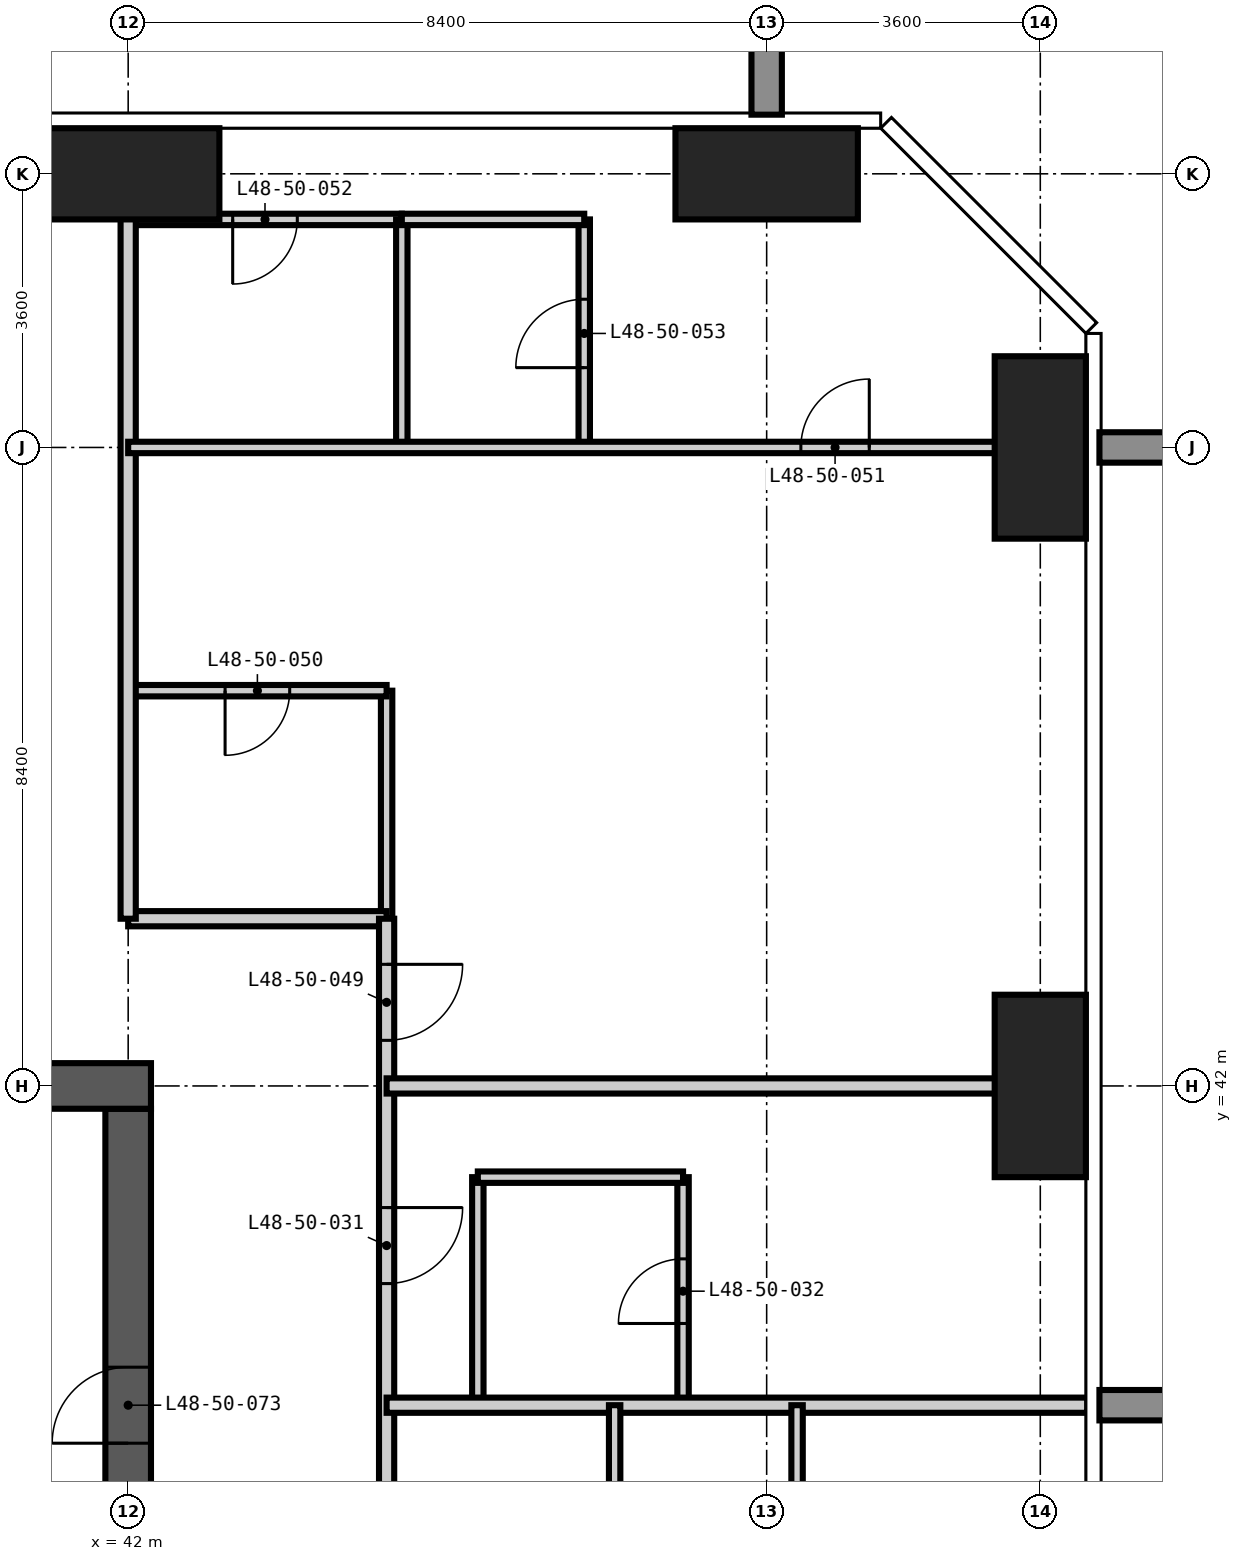
"""IFC4 building model, lengths in metres.
Left out: names, types, materials, properties, quantities, classifications, styles, units other than length and angle.
Written with IfcOpenShell. Run it as: python <this file> out.ifc"""

import sys

from ifc_helpers import new_model, si_unit, direction, frame, frame_2d, origin, origin_2d, place, context, subcontext, project, spatial, rectangle, extrude, element, fill, save


model = new_model("IFC4")
c1 = context("Model", 3, precision=1e-05, world=origin(), true_north=direction((0.0, 1.0)))
c2 = subcontext(c1, "Body", "Model", "MODEL_VIEW")
j1 = project(units=[si_unit("LENGTHUNIT", "METRE"), si_unit("PLANEANGLEUNIT", "RADIAN")], contexts=[c1])
p1 = place(None, origin())
s1 = spatial("IfcSite", under=j1, at=p1, CompositionType="ELEMENT")
p2 = place(p1, origin())
s2 = spatial("IfcBuilding", under=s1, at=p2, CompositionType="ELEMENT")
p3 = place(p2, frame((0.0, 0.0, 187.8)))
s3 = spatial("IfcBuildingStorey", under=s2, at=p3, CompositionType="ELEMENT", Elevation=187.8)
for number, where, z_axis, x_axis in (
    (1, (42.0, 54.0, -0.35), (0.0, 0.0, 1.0), (1.0, 0.0, 0.0)),
    (2, (50.4, 54.0, -0.35), (0.0, 0.0, 1.0), (1.0, 0.0, 0.0)),
):
    element("IfcColumn", number, at=place(p3, frame(where, z_axis=z_axis, x_axis=x_axis)), inside=s3, PredefinedType="COLUMN", context=c2, shape_type="SweptSolid", body=[
        extrude(rectangle(XDim=2.4, YDim=1.2, at=origin_2d()), origin(), (0.0, 0.0, 1.0), 3.6),
    ])
for number, where, z_axis, x_axis in (
    (3, (54.0, 42.0, -0.35), (0.0, 0.0, 1.0), (1.0, 0.0, 0.0)),
    (4, (54.0, 50.4, -0.35), (0.0, 0.0, 1.0), (1.0, 0.0, 0.0)),
):
    element("IfcColumn", number, at=place(p3, frame(where, z_axis=z_axis, x_axis=x_axis)), inside=s3, PredefinedType="COLUMN", context=c2, shape_type="SweptSolid", body=[
        extrude(rectangle(XDim=1.2, YDim=2.4, at=origin_2d()), origin(), (0.0, 0.0, 1.0), 3.6),
    ])
p4 = place(p3, frame((42.0, 17.1, -0.35), z_axis=(0.0, 0.0, 1.0), x_axis=(0.0, 1.0, 0.0)))
e5 = element("IfcWall", 5, at=p4, inside=s3, PredefinedType="SHEAR", context=c2, shape_type="SweptSolid", body=[
    extrude(rectangle(XDim=24.6, YDim=0.6, at=frame_2d((12.3, 0.0))), origin(), (0.0, 0.0, 1.0), 3.6),
])
p5 = place(p4, frame((0.5, 0.0, 0.35)))
e6 = element("IfcOpeningElement", 6, at=p5, cuts=e5, PredefinedType="OPENING", context=c2, shape_type="SweptSolid", body=[
    extrude(rectangle(XDim=1.2, YDim=2.2, at=frame_2d((0.6, 1.1))), frame((0.0, 0.31, 0.0), z_axis=(0.0, -1.0, 0.0), x_axis=(1.0, 0.0, 0.0)), (0.0, 0.0, 1.0), 0.62),
])
p6 = place(p4, frame((11.8, 0.0, 0.35)))
e7 = element("IfcOpeningElement", 7, at=p6, cuts=e5, PredefinedType="OPENING", context=c2, shape_type="SweptSolid", body=[
    extrude(rectangle(XDim=1.0, YDim=2.1, at=frame_2d((0.5, 1.05))), frame((0.0, 0.31, 0.0), z_axis=(0.0, -1.0, 0.0), x_axis=(1.0, 0.0, 0.0)), (0.0, 0.0, 1.0), 0.62),
])
p7 = place(p4, frame((20.2, 0.0, 0.35)))
e8 = element("IfcOpeningElement", 8, at=p7, cuts=e5, PredefinedType="OPENING", context=c2, shape_type="SweptSolid", body=[
    extrude(rectangle(XDim=1.0, YDim=2.1, at=frame_2d((0.5, 1.05))), frame((0.0, 0.31, 0.0), z_axis=(0.0, -1.0, 0.0), x_axis=(1.0, 0.0, 0.0)), (0.0, 0.0, 1.0), 0.62),
])
p8 = place(p3, frame((42.3, 42.0, -0.35), z_axis=(0.0, 0.0, 1.0), x_axis=(-1.0, 0.0, 0.0)))
e9 = element("IfcWall", 9, at=p8, inside=s3, PredefinedType="SHEAR", context=c2, shape_type="SweptSolid", body=[
    extrude(rectangle(XDim=25.8, YDim=0.6, at=frame_2d((12.9, 0.0))), origin(), (0.0, 0.0, 1.0), 3.6),
])
p9 = place(p8, frame((20.8, 0.0, 0.35)))
e10 = element("IfcOpeningElement", 10, at=p9, cuts=e9, PredefinedType="OPENING", context=c2, shape_type="SweptSolid", body=[
    extrude(rectangle(XDim=1.0, YDim=2.1, at=frame_2d((0.5, 1.05))), frame((0.0, 0.31, 0.0), z_axis=(0.0, -1.0, 0.0), x_axis=(1.0, 0.0, 0.0)), (0.0, 0.0, 1.0), 0.62),
])
p10 = place(p8, frame((10.2, 0.0, 0.35)))
e11 = element("IfcOpeningElement", 11, at=p10, cuts=e9, PredefinedType="OPENING", context=c2, shape_type="SweptSolid", body=[
    extrude(rectangle(XDim=1.2, YDim=2.2, at=frame_2d((0.6, 1.1))), frame((0.0, 0.31, 0.0), z_axis=(0.0, -1.0, 0.0), x_axis=(1.0, 0.0, 0.0)), (0.0, 0.0, 1.0), 0.62),
])
for number, where, z_axis, x_axis in (
    (12, (45.4, 44.2, 0.0), (0.0, 0.0, 1.0), (0.0, 1.0, 0.0)),
    (13, (46.6, 37.8, 0.0), (0.0, 0.0, 1.0), (0.0, 1.0, 0.0)),
):
    element("IfcWall", number, at=place(p3, frame(where, z_axis=z_axis, x_axis=x_axis)), inside=s3, PredefinedType="PARTITIONING", context=c2, shape_type="SweptSolid", body=[
        extrude(rectangle(XDim=3.0, YDim=0.15, at=frame_2d((1.5, 0.0))), origin(), (0.0, 0.0, 1.0), 3.25),
    ])
p11 = place(p3, frame((49.3, 37.8, 0.0), z_axis=(0.0, 0.0, 1.0), x_axis=(0.0, 1.0, 0.0)))
e14 = element("IfcWall", 14, at=p11, inside=s3, PredefinedType="PARTITIONING", context=c2, shape_type="SweptSolid", body=[
    extrude(rectangle(XDim=3.0, YDim=0.15, at=frame_2d((1.5, 0.0))), origin(), (0.0, 0.0, 1.0), 3.25),
])
p12 = place(p11, frame((1.075, 0.0, 0.0)))
e15 = element("IfcOpeningElement", 15, at=p12, cuts=e14, PredefinedType="OPENING", context=c2, shape_type="SweptSolid", body=[
    extrude(rectangle(XDim=0.85, YDim=2.1, at=frame_2d((0.425, 1.05))), frame((0.0, 0.085, 0.0), z_axis=(0.0, -1.0, 0.0), x_axis=(1.0, 0.0, 0.0)), (0.0, 0.0, 1.0), 0.17),
])
p13 = place(p3, frame((46.6, 40.8, 0.0), z_axis=(0.0, 0.0, 1.0), x_axis=(1.0, 0.0, 0.0)))
e16 = element("IfcWall", 16, at=p13, inside=s3, PredefinedType="PARTITIONING", context=c2, shape_type="SweptSolid", body=[
    extrude(rectangle(XDim=2.7, YDim=0.15, at=frame_2d((1.35, 0.0))), origin(), (0.0, 0.0, 1.0), 3.25),
])
p14 = place(p3, frame((42.0, 47.2, 0.0), z_axis=(0.0, 0.0, 1.0), x_axis=(1.0, 0.0, 0.0)))
e17 = element("IfcWall", 17, at=p14, inside=s3, PredefinedType="PARTITIONING", context=c2, shape_type="SweptSolid", body=[
    extrude(rectangle(XDim=3.4, YDim=0.15, at=frame_2d((1.7, 0.0))), origin(), (0.0, 0.0, 1.0), 3.25),
])
p15 = place(p14, frame((1.275, 0.0, 0.0)))
e18 = element("IfcOpeningElement", 18, at=p15, cuts=e17, PredefinedType="OPENING", context=c2, shape_type="SweptSolid", body=[
    extrude(rectangle(XDim=0.85, YDim=2.1, at=frame_2d((0.425, 1.05))), frame((0.0, 0.085, 0.0), z_axis=(0.0, -1.0, 0.0), x_axis=(1.0, 0.0, 0.0)), (0.0, 0.0, 1.0), 0.17),
])
p16 = place(p3, frame((42.0, 53.4, 0.0), z_axis=(0.0, 0.0, 1.0), x_axis=(1.0, 0.0, 0.0)))
e19 = element("IfcWall", 19, at=p16, inside=s3, PredefinedType="PARTITIONING", context=c2, shape_type="SweptSolid", body=[
    extrude(rectangle(XDim=3.6, YDim=0.15, at=frame_2d((1.8, 0.0))), origin(), (0.0, 0.0, 1.0), 3.25),
])
p17 = place(p16, frame((1.375, 0.0, 0.0)))
e20 = element("IfcOpeningElement", 20, at=p17, cuts=e19, PredefinedType="OPENING", context=c2, shape_type="SweptSolid", body=[
    extrude(rectangle(XDim=0.85, YDim=2.1, at=frame_2d((0.425, 1.05))), frame((0.0, 0.085, 0.0), z_axis=(0.0, -1.0, 0.0), x_axis=(1.0, 0.0, 0.0)), (0.0, 0.0, 1.0), 0.17),
])
p18 = place(p3, frame((42.0, 44.2, 0.0), z_axis=(0.0, 0.0, 1.0), x_axis=(1.0, 0.0, 0.0)))
e21 = element("IfcWall", 21, at=p18, inside=s3, PredefinedType="PARTITIONING", context=c2, shape_type="SweptSolid", body=[
    extrude(rectangle(XDim=3.4, YDim=0.2, at=frame_2d((1.7, 0.0))), origin(), (0.0, 0.0, 1.0), 3.25),
])
p19 = place(p3, frame((42.0, 54.618, 0.0), z_axis=(0.0, 0.0, 1.0), x_axis=(0.0, -1.0, 0.0)))
e22 = element("IfcWall", 22, at=p19, inside=s3, PredefinedType="PARTITIONING", context=c2, shape_type="SweptSolid", body=[
    extrude(rectangle(XDim=10.418, YDim=0.2, at=frame_2d((5.209, 0.0))), origin(), (0.0, 0.0, 1.0), 3.25),
])
p20 = place(p3, frame((45.4, 44.2, 0.0), z_axis=(0.0, 0.0, 1.0), x_axis=(0.0, -1.0, 0.0)))
e23 = element("IfcWall", 23, at=p20, inside=s3, PredefinedType="PARTITIONING", context=c2, shape_type="SweptSolid", body=[
    extrude(rectangle(XDim=30.2, YDim=0.2, at=frame_2d((15.1, 0.0))), origin(), (0.0, 0.0, 1.0), 3.25),
])
p21 = place(p20, frame((21.8, 0.0, 0.0)))
e24 = element("IfcOpeningElement", 24, at=p21, cuts=e23, PredefinedType="OPENING", context=c2, shape_type="SweptSolid", body=[
    extrude(rectangle(XDim=1.0, YDim=2.2, at=frame_2d((0.5, 1.1))), frame((0.0, 0.11, 0.0), z_axis=(0.0, -1.0, 0.0), x_axis=(1.0, 0.0, 0.0)), (0.0, 0.0, 1.0), 0.22),
])
p22 = place(p20, frame((11.0, 0.0, 0.0)))
e25 = element("IfcOpeningElement", 25, at=p22, cuts=e23, PredefinedType="OPENING", context=c2, shape_type="SweptSolid", body=[
    extrude(rectangle(XDim=1.0, YDim=2.2, at=frame_2d((0.5, 1.1))), frame((0.0, 0.11, 0.0), z_axis=(0.0, -1.0, 0.0), x_axis=(1.0, 0.0, 0.0)), (0.0, 0.0, 1.0), 0.22),
])
p23 = place(p20, frame((3.8, 0.0, 0.0)))
e26 = element("IfcOpeningElement", 26, at=p23, cuts=e23, PredefinedType="OPENING", context=c2, shape_type="SweptSolid", body=[
    extrude(rectangle(XDim=1.0, YDim=2.2, at=frame_2d((0.5, 1.1))), frame((0.0, 0.11, 0.0), z_axis=(0.0, -1.0, 0.0), x_axis=(1.0, 0.0, 0.0)), (0.0, 0.0, 1.0), 0.22),
])
p24 = place(p20, frame((28.3, 0.0, 0.0)))
e27 = element("IfcOpeningElement", 27, at=p24, cuts=e23, PredefinedType="OPENING", context=c2, shape_type="SweptSolid", body=[
    extrude(rectangle(XDim=1.0, YDim=2.2, at=frame_2d((0.5, 1.1))), frame((0.0, 0.11, 0.0), z_axis=(0.0, -1.0, 0.0), x_axis=(1.0, 0.0, 0.0)), (0.0, 0.0, 1.0), 0.22),
])
p25 = place(p20, frame((0.6, 0.0, 0.0)))
e28 = element("IfcOpeningElement", 28, at=p25, cuts=e23, PredefinedType="OPENING", context=c2, shape_type="SweptSolid", body=[
    extrude(rectangle(XDim=1.0, YDim=2.2, at=frame_2d((0.5, 1.1))), frame((0.0, 0.11, 0.0), z_axis=(0.0, -1.0, 0.0), x_axis=(1.0, 0.0, 0.0)), (0.0, 0.0, 1.0), 0.22),
])
for number, where, z_axis, x_axis in (
    (29, (45.4, 37.8, 0.0), (0.0, 0.0, 1.0), (1.0, 0.0, 0.0)),
    (30, (45.4, 42.0, 0.0), (0.0, 0.0, 1.0), (1.0, 0.0, 0.0)),
):
    element("IfcWall", number, at=place(p3, frame(where, z_axis=z_axis, x_axis=x_axis)), inside=s3, PredefinedType="PARTITIONING", context=c2, shape_type="SweptSolid", body=[
        extrude(rectangle(XDim=9.218, YDim=0.2, at=frame_2d((4.609, 0.0))), origin(), (0.0, 0.0, 1.0), 3.25),
    ])
p26 = place(p3, frame((45.6, 50.4, 0.0), z_axis=(0.0, 0.0, 1.0), x_axis=(0.0, 1.0, 0.0)))
e31 = element("IfcWall", 31, at=p26, inside=s3, PredefinedType="PARTITIONING", context=c2, shape_type="SweptSolid", body=[
    extrude(rectangle(XDim=3.0, YDim=0.15, at=frame_2d((1.5, 0.0))), origin(), (0.0, 0.0, 1.0), 3.25),
])
p27 = place(p3, frame((48.0, 50.4, 0.0), z_axis=(0.0, 0.0, 1.0), x_axis=(0.0, 1.0, 0.0)))
e32 = element("IfcWall", 32, at=p27, inside=s3, PredefinedType="PARTITIONING", context=c2, shape_type="SweptSolid", body=[
    extrude(rectangle(XDim=3.0, YDim=0.15, at=frame_2d((1.5, 0.0))), origin(), (0.0, 0.0, 1.0), 3.25),
])
p28 = place(p27, frame((1.05, 0.0, 0.0)))
e33 = element("IfcOpeningElement", 33, at=p28, cuts=e32, PredefinedType="OPENING", context=c2, shape_type="SweptSolid", body=[
    extrude(rectangle(XDim=0.9, YDim=2.1, at=frame_2d((0.45, 1.05))), frame((0.0, 0.085, 0.0), z_axis=(0.0, -1.0, 0.0), x_axis=(1.0, 0.0, 0.0)), (0.0, 0.0, 1.0), 0.17),
])
p29 = place(p3, frame((48.4, 33.6, 0.0), z_axis=(0.0, 0.0, 1.0), x_axis=(0.0, 1.0, 0.0)))
e34 = element("IfcWall", 34, at=p29, inside=s3, PredefinedType="PARTITIONING", context=c2, shape_type="SweptSolid", body=[
    extrude(rectangle(XDim=4.2, YDim=0.15, at=frame_2d((2.1, 0.0))), origin(), (0.0, 0.0, 1.0), 3.25),
])
p30 = place(p3, frame((50.8, 33.6, 0.0), z_axis=(0.0, 0.0, 1.0), x_axis=(0.0, 1.0, 0.0)))
e35 = element("IfcWall", 35, at=p30, inside=s3, PredefinedType="PARTITIONING", context=c2, shape_type="SweptSolid", body=[
    extrude(rectangle(XDim=4.2, YDim=0.15, at=frame_2d((2.1, 0.0))), origin(), (0.0, 0.0, 1.0), 3.25),
])
p31 = place(p30, frame((1.65, 0.0, 0.0)))
e36 = element("IfcOpeningElement", 36, at=p31, cuts=e35, PredefinedType="OPENING", context=c2, shape_type="SweptSolid", body=[
    extrude(rectangle(XDim=0.9, YDim=2.1, at=frame_2d((0.45, 1.05))), frame((0.0, 0.085, 0.0), z_axis=(0.0, -1.0, 0.0), x_axis=(1.0, 0.0, 0.0)), (0.0, 0.0, 1.0), 0.17),
])
p32 = place(p3, frame((42.0, 50.4, 0.0), z_axis=(0.0, 0.0, 1.0), x_axis=(1.0, 0.0, 0.0)))
e37 = element("IfcWall", 37, at=p32, inside=s3, PredefinedType="PARTITIONING", context=c2, shape_type="SweptSolid", body=[
    extrude(rectangle(XDim=12.618, YDim=0.15, at=frame_2d((6.309, 0.0))), origin(), (0.0, 0.0, 1.0), 3.25),
])
p33 = place(p32, frame((8.85, 0.0, 0.0)))
e38 = element("IfcOpeningElement", 38, at=p33, cuts=e37, PredefinedType="OPENING", context=c2, shape_type="SweptSolid", body=[
    extrude(rectangle(XDim=0.9, YDim=2.1, at=frame_2d((0.45, 1.05))), frame((0.0, 0.085, 0.0), z_axis=(0.0, -1.0, 0.0), x_axis=(1.0, 0.0, 0.0)), (0.0, 0.0, 1.0), 0.17),
])
p34 = place(p3, frame((45.6, 53.4, 0.0), z_axis=(0.0, 0.0, 1.0), x_axis=(1.0, 0.0, 0.0)))
e39 = element("IfcWall", 39, at=p34, inside=s3, PredefinedType="PARTITIONING", context=c2, shape_type="SweptSolid", body=[
    extrude(rectangle(XDim=2.4, YDim=0.15, at=frame_2d((1.2, 0.0))), origin(), (0.0, 0.0, 1.0), 3.25),
])
p35 = place(p23, origin())
e40 = element("IfcDoor", 40, at=p35, inside=s3, OperationType="SINGLE_SWING_LEFT", PredefinedType="DOOR", context=c2, shape_type="SweptSolid", body=[
    extrude(rectangle(XDim=1.0, YDim=2.2, at=frame_2d((0.5, 1.1))), frame((0.0, 0.025, 0.0), z_axis=(0.0, -1.0, 0.0), x_axis=(1.0, 0.0, 0.0)), (0.0, 0.0, 1.0), 0.05),
])
fill(e26, e40)
p36 = place(p12, origin())
e41 = element("IfcDoor", 41, at=p36, inside=s3, OperationType="SINGLE_SWING_LEFT", PredefinedType="DOOR", context=c2, shape_type="SweptSolid", body=[
    extrude(rectangle(XDim=0.85, YDim=2.1, at=frame_2d((0.425, 1.05))), frame((0.0, 0.025, 0.0), z_axis=(0.0, -1.0, 0.0), x_axis=(1.0, 0.0, 0.0)), (0.0, 0.0, 1.0), 0.05),
])
fill(e15, e41)
p37 = place(p25, origin())
e42 = element("IfcDoor", 42, at=p37, inside=s3, OperationType="SINGLE_SWING_LEFT", PredefinedType="DOOR", context=c2, shape_type="SweptSolid", body=[
    extrude(rectangle(XDim=1.0, YDim=2.2, at=frame_2d((0.5, 1.1))), frame((0.0, 0.025, 0.0), z_axis=(0.0, -1.0, 0.0), x_axis=(1.0, 0.0, 0.0)), (0.0, 0.0, 1.0), 0.05),
])
fill(e28, e42)
p38 = place(p15, frame((0.85, 0.0, 0.0), z_axis=(0.0, 0.0, 1.0), x_axis=(-1.0, 0.0, 0.0)))
e43 = element("IfcDoor", 43, at=p38, inside=s3, OperationType="SINGLE_SWING_RIGHT", PredefinedType="DOOR", context=c2, shape_type="SweptSolid", body=[
    extrude(rectangle(XDim=0.85, YDim=2.1, at=frame_2d((0.425, 1.05))), frame((0.0, 0.025, 0.0), z_axis=(0.0, -1.0, 0.0), x_axis=(1.0, 0.0, 0.0)), (0.0, 0.0, 1.0), 0.05),
])
fill(e18, e43)
p39 = place(p33, origin())
e44 = element("IfcDoor", 44, at=p39, inside=s3, OperationType="SINGLE_SWING_RIGHT", PredefinedType="DOOR", context=c2, shape_type="SweptSolid", body=[
    extrude(rectangle(XDim=0.9, YDim=2.1, at=frame_2d((0.45, 1.05))), frame((0.0, 0.025, 0.0), z_axis=(0.0, -1.0, 0.0), x_axis=(1.0, 0.0, 0.0)), (0.0, 0.0, 1.0), 0.05),
])
fill(e38, e44)
p40 = place(p17, frame((0.85, 0.0, 0.0), z_axis=(0.0, 0.0, 1.0), x_axis=(-1.0, 0.0, 0.0)))
e45 = element("IfcDoor", 45, at=p40, inside=s3, OperationType="SINGLE_SWING_RIGHT", PredefinedType="DOOR", context=c2, shape_type="SweptSolid", body=[
    extrude(rectangle(XDim=0.85, YDim=2.1, at=frame_2d((0.425, 1.05))), frame((0.0, 0.025, 0.0), z_axis=(0.0, -1.0, 0.0), x_axis=(1.0, 0.0, 0.0)), (0.0, 0.0, 1.0), 0.05),
])
fill(e20, e45)
p41 = place(p28, origin())
e46 = element("IfcDoor", 46, at=p41, inside=s3, OperationType="SINGLE_SWING_LEFT", PredefinedType="DOOR", context=c2, shape_type="SweptSolid", body=[
    extrude(rectangle(XDim=0.9, YDim=2.1, at=frame_2d((0.45, 1.05))), frame((0.0, 0.025, 0.0), z_axis=(0.0, -1.0, 0.0), x_axis=(1.0, 0.0, 0.0)), (0.0, 0.0, 1.0), 0.05),
])
fill(e33, e46)
p42 = place(p7, origin())
e47 = element("IfcDoor", 47, at=p42, inside=s3, OperationType="SINGLE_SWING_LEFT", PredefinedType="DOOR", context=c2, shape_type="SweptSolid", body=[
    extrude(rectangle(XDim=1.0, YDim=2.1, at=frame_2d((0.5, 1.05))), frame((0.0, 0.025, 0.0), z_axis=(0.0, -1.0, 0.0), x_axis=(1.0, 0.0, 0.0)), (0.0, 0.0, 1.0), 0.05),
])
fill(e8, e47)
save(model, sys.argv[1])
